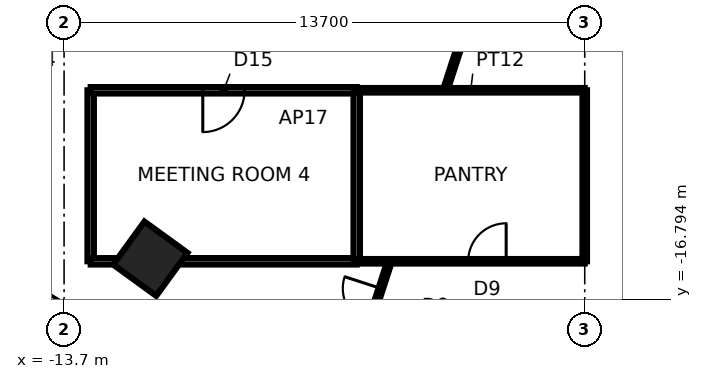
"""IFC4 building model, lengths in metres.
Left out: names, types, materials, properties, quantities, classifications, styles, units other than length and angle.
Written with IfcOpenShell. Run it as: python <this file> out.ifc"""

import sys

from ifc_helpers import new_model, si_unit, direction, frame, frame_2d, origin, origin_2d, place, context, subcontext, project, spatial, rectangle, extrude, element, fill, save


model = new_model("IFC4")
c1 = context("Model", 3, precision=1e-05, world=origin(), true_north=direction((0.0, 1.0)))
c2 = subcontext(c1, "Body", "Model", "MODEL_VIEW")
j1 = project(units=[si_unit("LENGTHUNIT", "METRE"), si_unit("PLANEANGLEUNIT", "RADIAN")], contexts=[c1])
p1 = place(None, origin())
s1 = spatial("IfcSite", under=j1, at=p1, CompositionType="ELEMENT")
p2 = place(p1, origin())
s2 = spatial("IfcBuilding", under=s1, at=p2, CompositionType="ELEMENT")
p3 = place(p2, frame((0.0, 0.0, 234.5)))
s3 = spatial("IfcBuildingStorey", under=s2, at=p3, CompositionType="ELEMENT", Elevation=234.5)
p4 = place(p3, frame((-11.43, -15.733, 0.0), z_axis=(0.0, 0.0, 1.0), x_axis=(-0.587785252292, -0.809016994375, 0.0)))
e1 = element("IfcColumn", 1, at=p4, inside=s3, PredefinedType="COLUMN", context=c2, shape_type="SweptSolid", body=[
    extrude(rectangle(XDim=1.4, YDim=1.4, at=origin_2d()), origin(), (0.0, 0.0, 1.0), 3.9),
])
p5 = place(p3, frame((-13.0, -11.3, 0.0), z_axis=(0.0, 0.0, 1.0), x_axis=(0.0, -1.0, 0.0)))
e2 = element("IfcWall", 2, at=p5, inside=s3, PredefinedType="PARTITIONING", context=c2, shape_type="SweptSolid", body=[
    extrude(rectangle(XDim=4.5, YDim=0.17, at=frame_2d((2.25, 0.0))), origin(), (0.0, 0.0, 1.0), 3.74),
])
p6 = place(p3, frame((-6.0, -11.3, 0.0), z_axis=(0.0, 0.0, 1.0), x_axis=(-1.0, 0.0, 0.0)))
e3 = element("IfcWall", 3, at=p6, inside=s3, PredefinedType="PARTITIONING", context=c2, shape_type="SweptSolid", body=[
    extrude(rectangle(XDim=7.0, YDim=0.17, at=frame_2d((3.5, 0.0))), origin(), (0.0, 0.0, 1.0), 3.74),
])
p7 = place(p6, frame((2.95, 0.0, 0.0)))
e4 = element("IfcOpeningElement", 4, at=p7, cuts=e3, PredefinedType="OPENING", context=c2, shape_type="SweptSolid", body=[
    extrude(rectangle(XDim=1.1, YDim=2.4, at=frame_2d((0.55, 1.2))), frame((0.0, 0.095, 0.0), z_axis=(0.0, -1.0, 0.0), x_axis=(1.0, 0.0, 0.0)), (0.0, 0.0, 1.0), 0.19),
])
p8 = place(p3, frame((-13.0, -15.8, 0.0), z_axis=(0.0, 0.0, 1.0), x_axis=(1.0, 0.0, 0.0)))
e5 = element("IfcWall", 5, at=p8, inside=s3, PredefinedType="PARTITIONING", context=c2, shape_type="SweptSolid", body=[
    extrude(rectangle(XDim=7.0, YDim=0.17, at=frame_2d((3.5, 0.0))), origin(), (0.0, 0.0, 1.0), 3.74),
])
p9 = place(p3, frame((-6.0, -11.3, 0.0), z_axis=(0.0, 0.0, 1.0), x_axis=(0.0, -1.0, 0.0)))
e6 = element("IfcWall", 6, at=p9, inside=s3, PredefinedType="PARTITIONING", context=c2, shape_type="SweptSolid", body=[
    extrude(rectangle(XDim=4.5, YDim=0.17, at=frame_2d((2.25, 0.0))), origin(), (0.0, 0.0, 1.0), 3.74),
])
p10 = place(p3, frame((-6.558, -20.185, 0.0), z_axis=(0.0, 0.0, 1.0), x_axis=(0.308990279462, 0.951065196082, 0.0)))
e7 = element("IfcWall", 7, at=p10, inside=s3, PredefinedType="PARTITIONING", context=c2, shape_type="SweptSolid", body=[
    extrude(rectangle(XDim=4.61, YDim=0.12, at=frame_2d((2.305, 0.0))), origin(), (0.0, 0.0, 1.0), 3.04),
])
p11 = place(p10, frame((2.859, 0.0, 0.0)))
e8 = element("IfcOpeningElement", 8, at=p11, cuts=e7, PredefinedType="OPENING", context=c2, shape_type="SweptSolid", body=[
    extrude(rectangle(XDim=1.0, YDim=2.4, at=frame_2d((0.5, 1.2))), frame((0.0, 0.07, 0.0), z_axis=(0.0, -1.0, 0.0), x_axis=(1.0, 0.0, 0.0)), (0.0, 0.0, 1.0), 0.14),
])
p12 = place(p3, frame((-3.672, -11.3, 0.0), z_axis=(0.0, 0.0, 1.0), x_axis=(0.309059822154, 0.95104259964, 0.0)))
e9 = element("IfcWall", 9, at=p12, inside=s3, PredefinedType="PARTITIONING", context=c2, shape_type="SweptSolid", body=[
    extrude(rectangle(XDim=1.893, YDim=0.12, at=frame_2d((0.946, 0.0))), origin(), (0.0, 0.0, 1.0), 3.04),
])
p13 = place(p3, frame((0.0, -11.3, 0.0), z_axis=(0.0, 0.0, 1.0), x_axis=(-1.0, 0.0, 0.0)))
e10 = element("IfcWall", 10, at=p13, inside=s3, PredefinedType="PARTITIONING", context=c2, shape_type="SweptSolid", body=[
    extrude(rectangle(XDim=6.0, YDim=0.12, at=frame_2d((3.0, 0.0))), origin(), (0.0, 0.0, 1.0), 3.74),
])
p14 = place(p3, frame((-6.0, -15.8, 0.0), z_axis=(0.0, 0.0, 1.0), x_axis=(1.0, 0.0, 0.0)))
e11 = element("IfcWall", 11, at=p14, inside=s3, PredefinedType="PARTITIONING", context=c2, shape_type="SweptSolid", body=[
    extrude(rectangle(XDim=6.0, YDim=0.12, at=frame_2d((3.0, 0.0))), origin(), (0.0, 0.0, 1.0), 3.334),
])
p15 = place(p14, frame((2.933, 0.0, 0.0)))
e12 = element("IfcOpeningElement", 12, at=p15, cuts=e11, PredefinedType="OPENING", context=c2, shape_type="SweptSolid", body=[
    extrude(rectangle(XDim=1.0, YDim=2.4, at=frame_2d((0.5, 1.2))), frame((0.0, 0.07, 0.0), z_axis=(0.0, -1.0, 0.0), x_axis=(1.0, 0.0, 0.0)), (0.0, 0.0, 1.0), 0.14),
])
p16 = place(p3, frame((0.0, -15.8, 0.0), z_axis=(0.0, 0.0, 1.0), x_axis=(0.0, 1.0, 0.0)))
e13 = element("IfcWall", 13, at=p16, inside=s3, PredefinedType="PARTITIONING", context=c2, shape_type="SweptSolid", body=[
    extrude(rectangle(XDim=4.5, YDim=0.12, at=frame_2d((2.25, 0.0))), origin(), (0.0, 0.0, 1.0), 3.04),
])
p17 = place(p7, origin())
e14 = element("IfcDoor", 14, at=p17, inside=s3, OperationType="SINGLE_SWING_RIGHT", PredefinedType="DOOR", context=c2, shape_type="SweptSolid", body=[
    extrude(rectangle(XDim=1.1, YDim=2.4, at=frame_2d((0.55, 1.2))), frame((0.0, 0.025, 0.0), z_axis=(0.0, -1.0, 0.0), x_axis=(1.0, 0.0, 0.0)), (0.0, 0.0, 1.0), 0.05),
])
fill(e4, e14)
p18 = place(p15, origin())
e15 = element("IfcDoor", 15, at=p18, inside=s3, OperationType="SINGLE_SWING_RIGHT", PredefinedType="DOOR", context=c2, shape_type="SweptSolid", body=[
    extrude(rectangle(XDim=1.0, YDim=2.4, at=frame_2d((0.5, 1.2))), frame((0.0, 0.025, 0.0), z_axis=(0.0, -1.0, 0.0), x_axis=(1.0, 0.0, 0.0)), (0.0, 0.0, 1.0), 0.05),
])
fill(e12, e15)
p19 = place(p11, origin())
e16 = element("IfcDoor", 16, at=p19, inside=s3, OperationType="SINGLE_SWING_RIGHT", PredefinedType="DOOR", context=c2, shape_type="SweptSolid", body=[
    extrude(rectangle(XDim=1.0, YDim=2.4, at=frame_2d((0.5, 1.2))), frame((0.0, 0.025, 0.0), z_axis=(0.0, -1.0, 0.0), x_axis=(1.0, 0.0, 0.0)), (0.0, 0.0, 1.0), 0.05),
])
fill(e8, e16)
save(model, sys.argv[1])
